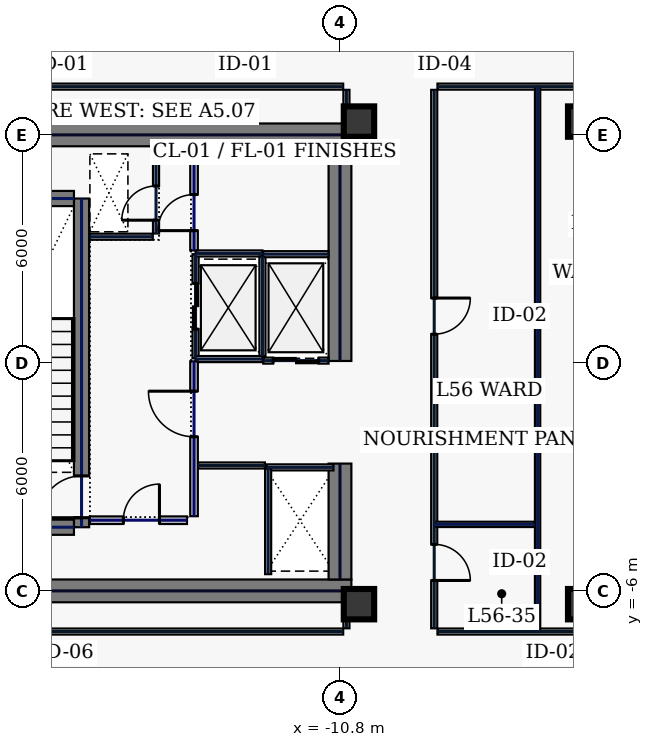
"""IFC4 building model, lengths in metres.
Left out: names, types, materials, properties, quantities, classifications, styles, units other than length and angle.
Written with IfcOpenShell. Run it as: python <this file> out.ifc"""

import sys

from ifc_helpers import new_model, si_unit, direction, frame, frame_2d, origin, origin_2d, place, context, subcontext, project, spatial, rectangle, hollow_rectangle, extrude, element, fill, save


model = new_model("IFC4")
c1 = context("Model", 3, precision=1e-05, world=origin(), true_north=direction((0.0, 1.0)))
c2 = subcontext(c1, "Body", "Model", "MODEL_VIEW")
j1 = project(units=[si_unit("LENGTHUNIT", "METRE"), si_unit("PLANEANGLEUNIT", "RADIAN")], contexts=[c1])
p1 = place(None, origin())
s1 = spatial("IfcSite", under=j1, at=p1, CompositionType="ELEMENT")
p2 = place(p1, origin())
s2 = spatial("IfcBuilding", under=s1, at=p2, CompositionType="ELEMENT")
p3 = place(p2, frame((0.0, 0.0, 243.0)))
s3 = spatial("IfcBuildingStorey", under=s2, at=p3, CompositionType="ELEMENT", Elevation=243.0)
for number, where, z_axis, x_axis in (
    (1, (-22.0, 6.0, 0.0), (0.0, 0.0, 1.0), (1.0, 0.0, 0.0)),
    (2, (-22.0, -6.0, 0.0), (0.0, 0.0, 1.0), (1.0, 0.0, 0.0)),
):
    element("IfcWall", number, at=place(p3, frame(where, z_axis=z_axis, x_axis=x_axis)), inside=s3, PredefinedType="SHEAR", context=c2, shape_type="SweptSolid", body=[
        extrude(rectangle(XDim=11.5, YDim=0.6, at=frame_2d((5.75, 0.0))), origin(), (0.0, 0.0, 1.0), 3.74),
    ])
p4 = place(p3, frame((-10.8, -5.7, 0.0), z_axis=(0.0, 0.0, 1.0), x_axis=(0.0, 1.0, 0.0)))
e3 = element("IfcWall", 3, at=p4, inside=s3, PredefinedType="SHEAR", context=c2, shape_type="SweptSolid", body=[
    extrude(rectangle(XDim=3.05, YDim=0.6, at=frame_2d((1.525, 0.0))), origin(), (0.0, 0.0, 1.0), 3.74),
])
p5 = place(p3, frame((-10.8, 0.05, 0.0), z_axis=(0.0, 0.0, 1.0), x_axis=(0.0, 1.0, 0.0)))
e4 = element("IfcWall", 4, at=p5, inside=s3, PredefinedType="SHEAR", context=c2, shape_type="SweptSolid", body=[
    extrude(rectangle(XDim=5.65, YDim=0.6, at=frame_2d((2.825, 0.0))), origin(), (0.0, 0.0, 1.0), 3.74),
])
p6 = place(p3, frame((-17.6, -4.325, 0.0), z_axis=(0.0, 0.0, 1.0), x_axis=(0.0, 1.0, 0.0)))
e5 = element("IfcWall", 5, at=p6, inside=s3, PredefinedType="SHEAR", context=c2, shape_type="SweptSolid", body=[
    extrude(rectangle(XDim=8.65, YDim=0.4, at=frame_2d((4.325, 0.0))), origin(), (0.0, 0.0, 1.0), 3.74),
])
p7 = place(p6, frame((0.25, 0.0, 0.0)))
e6 = element("IfcOpeningElement", 6, at=p7, cuts=e5, PredefinedType="OPENING", context=c2, shape_type="SweptSolid", body=[
    extrude(rectangle(XDim=1.1, YDim=2.2, at=frame_2d((0.55, 1.1))), frame((0.0, 0.21, 0.0), z_axis=(0.0, -1.0, 0.0), x_axis=(1.0, 0.0, 0.0)), (0.0, 0.0, 1.0), 0.42),
])
for number, where, z_axis, x_axis in (
    (7, (-21.2, -4.325, 0.0), (0.0, 0.0, 1.0), (1.0, 0.0, 0.0)),
    (8, (-21.2, 4.325, 0.0), (0.0, 0.0, 1.0), (1.0, 0.0, 0.0)),
):
    element("IfcWall", number, at=place(p3, frame(where, z_axis=z_axis, x_axis=x_axis)), inside=s3, PredefinedType="SHEAR", context=c2, shape_type="SweptSolid", body=[
        extrude(rectangle(XDim=3.4, YDim=0.4, at=frame_2d((1.7, 0.0))), origin(), (0.0, 0.0, 1.0), 3.74),
    ])
for number, where, z_axis, x_axis in (
    (9, (-10.3, -6.35, 0.0), (0.0, 0.0, 1.0), (1.0, 0.0, 0.0)),
    (10, (-10.3, 6.35, 0.0), (0.0, 0.0, 1.0), (1.0, 0.0, 0.0)),
    (11, (-4.4, -6.35, 0.0), (0.0, 0.0, 1.0), (1.0, 0.0, 0.0)),
    (12, (-4.4, 6.35, 0.0), (0.0, 0.0, 1.0), (1.0, 0.0, 0.0)),
):
    element("IfcColumn", number, at=place(p3, frame(where, z_axis=z_axis, x_axis=x_axis)), inside=s3, PredefinedType="COLUMN", context=c2, shape_type="SweptSolid", body=[
        extrude(hollow_rectangle(XDim=0.8, YDim=0.8, WallThickness=0.036, at=origin_2d()), origin(), (0.0, 0.0, 1.0), 3.74),
    ])
p8 = place(p3, frame((-14.6, 0.12, 0.0), z_axis=(0.0, 0.0, 1.0), x_axis=(0.0, 1.0, 0.0)))
e13 = element("IfcWall", 13, at=p8, inside=s3, PredefinedType="PARTITIONING", context=c2, shape_type="SweptSolid", body=[
    extrude(rectangle(XDim=2.74, YDim=0.16, at=frame_2d((1.37, 0.0))), origin(), (0.0, 0.0, 1.0), 3.74),
])
p9 = place(p8, frame((0.77, 0.0, 0.0)))
e14 = element("IfcOpeningElement", 14, at=p9, cuts=e13, PredefinedType="OPENING", context=c2, shape_type="SweptSolid", body=[
    extrude(rectangle(XDim=1.2, YDim=2.2, at=frame_2d((0.6, 1.1))), frame((0.0, 0.09, 0.0), z_axis=(0.0, -1.0, 0.0), x_axis=(1.0, 0.0, 0.0)), (0.0, 0.0, 1.0), 0.18),
])
for number, where, z_axis, x_axis in (
    (15, (-14.6, 0.1, 0.0), (0.0, 0.0, 1.0), (1.0, 0.0, 0.0)),
    (16, (-14.6, 2.88, 0.0), (0.0, 0.0, 1.0), (1.0, 0.0, 0.0)),
):
    element("IfcWall", number, at=place(p3, frame(where, z_axis=z_axis, x_axis=x_axis)), inside=s3, PredefinedType="PARTITIONING", context=c2, shape_type="SweptSolid", body=[
        extrude(rectangle(XDim=1.76, YDim=0.16, at=frame_2d((0.88, 0.0))), origin(), (0.0, 0.0, 1.0), 3.74),
    ])
p10 = place(p3, frame((-12.84, 0.18, 0.0), z_axis=(0.0, 0.0, 1.0), x_axis=(0.0, 1.0, 0.0)))
e17 = element("IfcWall", 17, at=p10, inside=s3, PredefinedType="PARTITIONING", context=c2, shape_type="SweptSolid", body=[
    extrude(rectangle(XDim=2.62, YDim=0.16, at=frame_2d((1.31, 0.0))), origin(), (0.0, 0.0, 1.0), 3.74),
])
p11 = place(p3, frame((-12.73, -2.75, 0.0), z_axis=(0.0, 0.0, 1.0), x_axis=(1.0, 0.0, 0.0)))
e18 = element("IfcWall", 18, at=p11, inside=s3, PredefinedType="PARTITIONING", context=c2, shape_type="SweptSolid", body=[
    extrude(rectangle(XDim=1.76, YDim=0.16, at=frame_2d((0.88, 0.0))), origin(), (0.0, 0.0, 1.0), 3.74),
])
p12 = place(p3, frame((-12.82, 0.06, 0.0), z_axis=(0.0, 0.0, 1.0), x_axis=(1.0, 0.0, 0.0)))
e19 = element("IfcWall", 19, at=p12, inside=s3, PredefinedType="PARTITIONING", context=c2, shape_type="SweptSolid", body=[
    extrude(rectangle(XDim=1.72, YDim=0.16, at=frame_2d((0.86, 0.0))), origin(), (0.0, 0.0, 1.0), 3.74),
])
p13 = place(p12, frame((0.26, 0.0, 0.0)))
e20 = element("IfcOpeningElement", 20, at=p13, cuts=e19, PredefinedType="OPENING", context=c2, shape_type="SweptSolid", body=[
    extrude(rectangle(XDim=1.2, YDim=2.2, at=frame_2d((0.6, 1.1))), frame((0.0, 0.09, 0.0), z_axis=(0.0, -1.0, 0.0), x_axis=(1.0, 0.0, 0.0)), (0.0, 0.0, 1.0), 0.18),
])
p14 = place(p3, frame((-12.82, 2.86, 0.0), z_axis=(0.0, 0.0, 1.0), x_axis=(1.0, 0.0, 0.0)))
e21 = element("IfcWall", 21, at=p14, inside=s3, PredefinedType="PARTITIONING", context=c2, shape_type="SweptSolid", body=[
    extrude(rectangle(XDim=1.72, YDim=0.16, at=frame_2d((0.86, 0.0))), origin(), (0.0, 0.0, 1.0), 3.74),
])
p15 = place(p3, frame((-15.64, 3.405, 0.0), z_axis=(0.0, 0.0, 1.0), x_axis=(0.0, 1.0, 0.0)))
e22 = element("IfcWall", 22, at=p15, inside=s3, PredefinedType="PARTITIONING", context=c2, shape_type="SweptSolid", body=[
    extrude(rectangle(XDim=2.155, YDim=0.16, at=frame_2d((1.078, 0.0))), origin(), (0.0, 0.0, 1.0), 3.74),
])
p16 = place(p15, frame((0.35, 0.0, 0.0)))
e23 = element("IfcOpeningElement", 23, at=p16, cuts=e22, PredefinedType="OPENING", context=c2, shape_type="SweptSolid", body=[
    extrude(rectangle(XDim=0.9, YDim=2.2, at=frame_2d((0.45, 1.1))), frame((0.0, 0.09, 0.0), z_axis=(0.0, -1.0, 0.0), x_axis=(1.0, 0.0, 0.0)), (0.0, 0.0, 1.0), 0.18),
])
p17 = place(p3, frame((-17.38, 3.32, 0.0), z_axis=(0.0, 0.0, 1.0), x_axis=(1.0, 0.0, 0.0)))
e24 = element("IfcWall", 24, at=p17, inside=s3, PredefinedType="PARTITIONING", context=c2, shape_type="SweptSolid", body=[
    extrude(rectangle(XDim=1.655, YDim=0.16, at=frame_2d((0.827, 0.0))), origin(), (0.0, 0.0, 1.0), 3.74),
])
p18 = place(p3, frame((-17.38, -4.14, 0.0), z_axis=(0.0, 0.0, 1.0), x_axis=(1.0, 0.0, 0.0)))
e25 = element("IfcWall", 25, at=p18, inside=s3, PredefinedType="SOLIDWALL", context=c2, shape_type="SweptSolid", body=[
    extrude(rectangle(XDim=2.555, YDim=0.2, at=frame_2d((1.277, 0.0))), origin(), (0.0, 0.0, 1.0), 3.74),
])
p19 = place(p18, frame((0.88, 0.0, 0.0)))
e26 = element("IfcOpeningElement", 26, at=p19, cuts=e25, PredefinedType="OPENING", context=c2, shape_type="SweptSolid", body=[
    extrude(rectangle(XDim=0.95, YDim=2.2, at=frame_2d((0.475, 1.1))), frame((0.0, 0.11, 0.0), z_axis=(0.0, -1.0, 0.0), x_axis=(1.0, 0.0, 0.0)), (0.0, 0.0, 1.0), 0.22),
])
p20 = place(p3, frame((-14.535, -2.7, 0.0), z_axis=(0.0, 0.0, 1.0), x_axis=(1.0, 0.0, 0.0)))
e27 = element("IfcWall", 27, at=p20, inside=s3, PredefinedType="PARTITIONING", context=c2, shape_type="SweptSolid", body=[
    extrude(rectangle(XDim=1.76, YDim=0.16, at=frame_2d((0.88, 0.0))), origin(), (0.0, 0.0, 1.0), 3.74),
])
p21 = place(p3, frame((-12.69, -5.56, 0.0), z_axis=(0.0, 0.0, 1.0), x_axis=(0.0, 1.0, 0.0)))
e28 = element("IfcWall", 28, at=p21, inside=s3, PredefinedType="PARTITIONING", context=c2, shape_type="SweptSolid", body=[
    extrude(rectangle(XDim=2.775, YDim=0.16, at=frame_2d((1.388, 0.0))), origin(), (0.0, 0.0, 1.0), 3.74),
])
p22 = place(p3, frame((-14.64, 2.96, 0.0), z_axis=(0.0, 0.0, 1.0), x_axis=(0.0, 1.0, 0.0)))
e29 = element("IfcWall", 29, at=p22, inside=s3, PredefinedType="SOLIDWALL", context=c2, shape_type="SweptSolid", body=[
    extrude(rectangle(XDim=2.6, YDim=0.2, at=frame_2d((1.3, 0.0))), origin(), (0.0, 0.0, 1.0), 3.74),
])
p23 = place(p22, frame((0.52, 0.0, 0.0)))
e30 = element("IfcOpeningElement", 30, at=p23, cuts=e29, PredefinedType="OPENING", context=c2, shape_type="SweptSolid", body=[
    extrude(rectangle(XDim=0.95, YDim=2.2, at=frame_2d((0.475, 1.1))), frame((0.0, 0.11, 0.0), z_axis=(0.0, -1.0, 0.0), x_axis=(1.0, 0.0, 0.0)), (0.0, 0.0, 1.0), 0.22),
])
p24 = place(p3, frame((-14.64, -4.035, 0.0), z_axis=(0.0, 0.0, 1.0), x_axis=(0.0, 1.0, 0.0)))
e31 = element("IfcWall", 31, at=p24, inside=s3, PredefinedType="SOLIDWALL", context=c2, shape_type="SweptSolid", body=[
    extrude(rectangle(XDim=4.075, YDim=0.2, at=frame_2d((2.038, 0.0))), origin(), (0.0, 0.0, 1.0), 3.74),
])
p25 = place(p24, frame((2.09, 0.0, 0.0)))
e32 = element("IfcOpeningElement", 32, at=p25, cuts=e31, PredefinedType="OPENING", context=c2, shape_type="SweptSolid", body=[
    extrude(rectangle(XDim=1.2, YDim=2.2, at=frame_2d((0.6, 1.1))), frame((0.0, 0.11, 0.0), z_axis=(0.0, -1.0, 0.0), x_axis=(1.0, 0.0, 0.0)), (0.0, 0.0, 1.0), 0.22),
])
p26 = place(p3, frame((-3.965, 7.27, 0.0), z_axis=(0.0, 0.0, 1.0), x_axis=(-1.0, 0.0, 0.0)))
e33 = element("IfcWall", 33, at=p26, inside=s3, PredefinedType="PARTITIONING", context=c2, shape_type="SweptSolid", body=[
    extrude(rectangle(XDim=4.27, YDim=0.16, at=frame_2d((2.135, 0.0))), origin(), (0.0, 0.0, 1.0), 3.74),
])
p27 = place(p3, frame((-8.32, 7.185, 0.0), z_axis=(0.0, 0.0, 1.0), x_axis=(0.0, -1.0, 0.0)))
e34 = element("IfcWall", 34, at=p27, inside=s3, PredefinedType="PARTITIONING", context=c2, shape_type="SweptSolid", body=[
    extrude(rectangle(XDim=14.17, YDim=0.16, at=frame_2d((7.085, 0.0))), origin(), (0.0, 0.0, 1.0), 3.74),
])
p28 = place(p27, frame((11.961, 0.0, 0.0)))
e35 = element("IfcOpeningElement", 35, at=p28, cuts=e34, PredefinedType="OPENING", context=c2, shape_type="SweptSolid", body=[
    extrude(rectangle(XDim=0.95, YDim=2.2, at=frame_2d((0.475, 1.1))), frame((0.0, 0.09, 0.0), z_axis=(0.0, -1.0, 0.0), x_axis=(1.0, 0.0, 0.0)), (0.0, 0.0, 1.0), 0.18),
])
p29 = place(p27, frame((5.479, 0.0, 0.0)))
e36 = element("IfcOpeningElement", 36, at=p29, cuts=e34, PredefinedType="OPENING", context=c2, shape_type="SweptSolid", body=[
    extrude(rectangle(XDim=0.95, YDim=2.2, at=frame_2d((0.475, 1.1))), frame((0.0, 0.09, 0.0), z_axis=(0.0, -1.0, 0.0), x_axis=(1.0, 0.0, 0.0)), (0.0, 0.0, 1.0), 0.18),
])
p30 = place(p3, frame((-8.235, -7.07, 0.0), z_axis=(0.0, 0.0, 1.0), x_axis=(1.0, 0.0, 0.0)))
e37 = element("IfcWall", 37, at=p30, inside=s3, PredefinedType="PARTITIONING", context=c2, shape_type="SweptSolid", body=[
    extrude(rectangle(XDim=4.27, YDim=0.16, at=frame_2d((2.135, 0.0))), origin(), (0.0, 0.0, 1.0), 3.74),
])
p31 = place(p3, frame((-10.63, -6.985, 0.0), z_axis=(0.0, 0.0, 1.0), x_axis=(0.0, 1.0, 0.0)))
e38 = element("IfcWall", 38, at=p31, inside=s3, PredefinedType="PARTITIONING", context=c2, shape_type="SweptSolid", body=[
    extrude(rectangle(XDim=0.565, YDim=0.16, at=frame_2d((0.283, 0.0))), origin(), (0.0, 0.0, 1.0), 3.74),
])
p32 = place(p3, frame((-10.63, 6.42, 0.0), z_axis=(0.0, 0.0, 1.0), x_axis=(0.0, 1.0, 0.0)))
e39 = element("IfcWall", 39, at=p32, inside=s3, PredefinedType="PARTITIONING", context=c2, shape_type="SweptSolid", body=[
    extrude(rectangle(XDim=0.765, YDim=0.16, at=frame_2d((0.383, 0.0))), origin(), (0.0, 0.0, 1.0), 3.74),
])
for number, where, z_axis, x_axis in (
    (40, (-10.715, 7.27, 0.0), (0.0, 0.0, 1.0), (-1.0, 0.0, 0.0)),
    (41, (-22.585, -7.07, 0.0), (0.0, 0.0, 1.0), (1.0, 0.0, 0.0)),
):
    element("IfcWall", number, at=place(p3, frame(where, z_axis=z_axis, x_axis=x_axis)), inside=s3, PredefinedType="PARTITIONING", context=c2, shape_type="SweptSolid", body=[
        extrude(rectangle(XDim=11.87, YDim=0.16, at=frame_2d((5.935, 0.0))), origin(), (0.0, 0.0, 1.0), 3.74),
    ])
p33 = place(p3, frame((-5.6, -7.065, 0.0), z_axis=(0.0, 0.0, 1.0), x_axis=(0.0, 1.0, 0.0)))
e42 = element("IfcWall", 42, at=p33, inside=s3, PredefinedType="PARTITIONING", context=c2, shape_type="SweptSolid", body=[
    extrude(rectangle(XDim=14.33, YDim=0.14, at=frame_2d((7.165, 0.0))), origin(), (0.0, 0.0, 1.0), 3.74),
])
p34 = place(p3, frame((-8.315, -4.25, 0.0), z_axis=(0.0, 0.0, 1.0), x_axis=(1.0, 0.0, 0.0)))
e43 = element("IfcWall", 43, at=p34, inside=s3, PredefinedType="PARTITIONING", context=c2, shape_type="SweptSolid", body=[
    extrude(rectangle(XDim=2.64, YDim=0.14, at=frame_2d((1.32, 0.0))), origin(), (0.0, 0.0, 1.0), 3.74),
])
p35 = place(p7, origin())
e44 = element("IfcDoor", 44, at=p35, inside=s3, OperationType="SINGLE_SWING_LEFT", PredefinedType="DOOR", context=c2, shape_type="SweptSolid", body=[
    extrude(rectangle(XDim=1.1, YDim=2.2, at=frame_2d((0.55, 1.1))), frame((0.0, 0.025, 0.0), z_axis=(0.0, -1.0, 0.0), x_axis=(1.0, 0.0, 0.0)), (0.0, 0.0, 1.0), 0.05),
])
fill(e6, e44)
p36 = place(p9, origin())
e45 = element("IfcDoor", 45, at=p36, inside=s3, OperationType="SLIDING_TO_LEFT", PredefinedType="DOOR", context=c2, shape_type="SweptSolid", body=[
    extrude(rectangle(XDim=1.2, YDim=2.2, at=frame_2d((0.6, 1.1))), frame((0.0, 0.025, 0.0), z_axis=(0.0, -1.0, 0.0), x_axis=(1.0, 0.0, 0.0)), (0.0, 0.0, 1.0), 0.05),
])
fill(e14, e45)
p37 = place(p13, origin())
e46 = element("IfcDoor", 46, at=p37, inside=s3, OperationType="SLIDING_TO_LEFT", PredefinedType="DOOR", context=c2, shape_type="SweptSolid", body=[
    extrude(rectangle(XDim=1.2, YDim=2.2, at=frame_2d((0.6, 1.1))), frame((0.0, 0.025, 0.0), z_axis=(0.0, -1.0, 0.0), x_axis=(1.0, 0.0, 0.0)), (0.0, 0.0, 1.0), 0.05),
])
fill(e20, e46)
p38 = place(p16, origin())
e47 = element("IfcDoor", 47, at=p38, inside=s3, OperationType="SINGLE_SWING_LEFT", PredefinedType="DOOR", context=c2, shape_type="SweptSolid", body=[
    extrude(rectangle(XDim=0.9, YDim=2.2, at=frame_2d((0.45, 1.1))), frame((0.0, 0.025, 0.0), z_axis=(0.0, -1.0, 0.0), x_axis=(1.0, 0.0, 0.0)), (0.0, 0.0, 1.0), 0.05),
])
fill(e23, e47)
p39 = place(p19, origin())
e48 = element("IfcDoor", 48, at=p39, inside=s3, OperationType="SINGLE_SWING_RIGHT", PredefinedType="DOOR", context=c2, shape_type="SweptSolid", body=[
    extrude(rectangle(XDim=0.95, YDim=2.2, at=frame_2d((0.475, 1.1))), frame((0.0, 0.025, 0.0), z_axis=(0.0, -1.0, 0.0), x_axis=(1.0, 0.0, 0.0)), (0.0, 0.0, 1.0), 0.05),
])
fill(e26, e48)
p40 = place(p23, origin())
e49 = element("IfcDoor", 49, at=p40, inside=s3, OperationType="SINGLE_SWING_LEFT", PredefinedType="DOOR", context=c2, shape_type="SweptSolid", body=[
    extrude(rectangle(XDim=0.95, YDim=2.2, at=frame_2d((0.475, 1.1))), frame((0.0, 0.025, 0.0), z_axis=(0.0, -1.0, 0.0), x_axis=(1.0, 0.0, 0.0)), (0.0, 0.0, 1.0), 0.05),
])
fill(e30, e49)
p41 = place(p25, origin())
e50 = element("IfcDoor", 50, at=p41, inside=s3, OperationType="SINGLE_SWING_RIGHT", PredefinedType="DOOR", context=c2, shape_type="SweptSolid", body=[
    extrude(rectangle(XDim=1.2, YDim=2.2, at=frame_2d((0.6, 1.1))), frame((0.0, 0.025, 0.0), z_axis=(0.0, -1.0, 0.0), x_axis=(1.0, 0.0, 0.0)), (0.0, 0.0, 1.0), 0.05),
])
fill(e32, e50)
p42 = place(p28, origin())
e51 = element("IfcDoor", 51, at=p42, inside=s3, OperationType="SINGLE_SWING_RIGHT", PredefinedType="DOOR", context=c2, shape_type="SweptSolid", body=[
    extrude(rectangle(XDim=0.95, YDim=2.2, at=frame_2d((0.475, 1.1))), frame((0.0, 0.025, 0.0), z_axis=(0.0, -1.0, 0.0), x_axis=(1.0, 0.0, 0.0)), (0.0, 0.0, 1.0), 0.05),
])
fill(e35, e51)
p43 = place(p29, origin())
e52 = element("IfcDoor", 52, at=p43, inside=s3, OperationType="SINGLE_SWING_LEFT", PredefinedType="DOOR", context=c2, shape_type="SweptSolid", body=[
    extrude(rectangle(XDim=0.95, YDim=2.2, at=frame_2d((0.475, 1.1))), frame((0.0, 0.025, 0.0), z_axis=(0.0, -1.0, 0.0), x_axis=(1.0, 0.0, 0.0)), (0.0, 0.0, 1.0), 0.05),
])
fill(e36, e52)
save(model, sys.argv[1])
